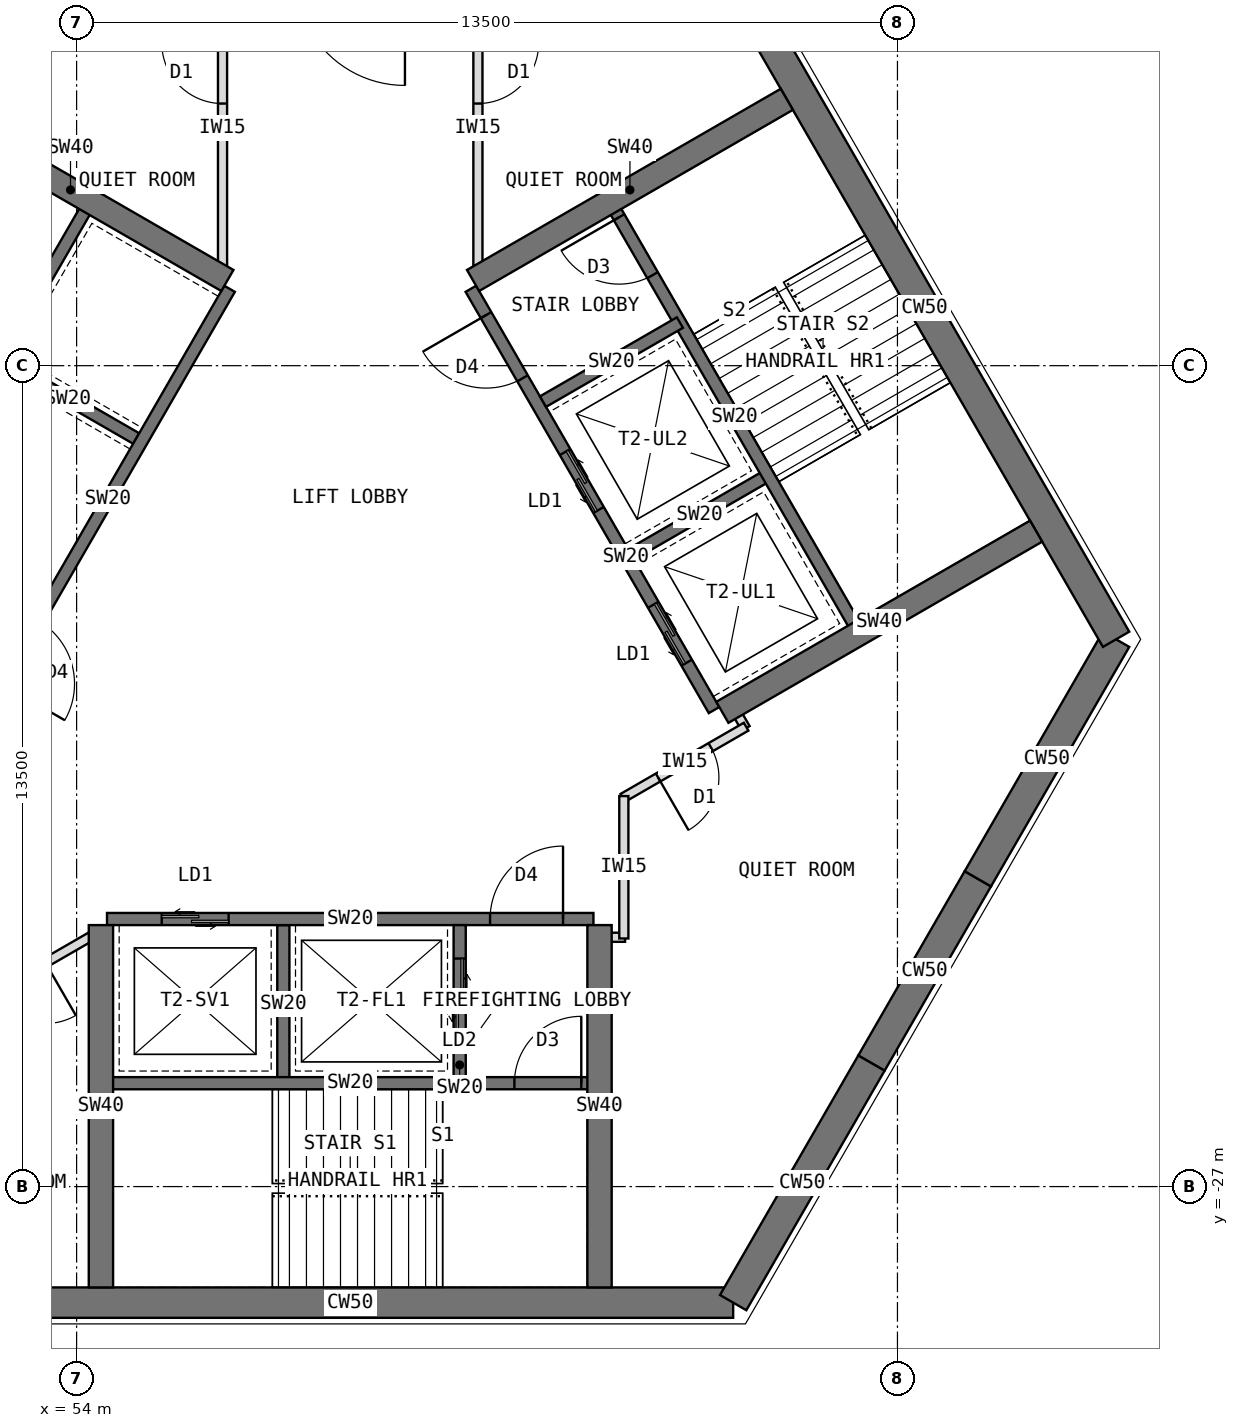
"""IFC4 building model, lengths in metres.
Left out: names, types, materials, properties, quantities, classifications, styles, units other than length and angle.
Written with IfcOpenShell. Run it as: python <this file> out.ifc"""

import sys

from ifc_helpers import new_model, si_unit, direction, frame, frame_2d, origin, place, context, subcontext, project, spatial, rectangle, extrude, element, fill, save


model = new_model("IFC4")
c1 = context("Model", 3, precision=1e-05, world=origin(), true_north=direction((0.0, 1.0)))
c2 = subcontext(c1, "Body", "Model", "MODEL_VIEW")
j1 = project(units=[si_unit("LENGTHUNIT", "METRE"), si_unit("PLANEANGLEUNIT", "RADIAN")], contexts=[c1])
p1 = place(None, origin())
s1 = spatial("IfcSite", under=j1, at=p1, CompositionType="ELEMENT")
p2 = place(p1, origin())
s2 = spatial("IfcBuilding", under=s1, at=p2, CompositionType="ELEMENT")
p3 = place(p2, frame((0.0, 0.0, 234.5)))
s3 = spatial("IfcBuildingStorey", under=s2, at=p3, CompositionType="ELEMENT", Elevation=234.5)
p4 = place(p3, frame((52.202, -28.908, 0.0), z_axis=(0.0, 0.0, 1.0), x_axis=(1.0, 0.0, 0.0)))
e1 = element("IfcWall", 1, at=p4, inside=s3, PredefinedType="SHEAR", context=c2, shape_type="SweptSolid", body=[
    extrude(rectangle(XDim=12.596, YDim=0.5, at=frame_2d((6.298, 0.0))), origin(), (0.0, 0.0, 1.0), 4.0),
])
p5 = place(p3, frame((64.798, -28.908, 0.0), z_axis=(0.0, 0.0, 1.0), x_axis=(0.499984222037, 0.866034513004, 0.0)))
e2 = element("IfcWall", 2, at=p5, inside=s3, PredefinedType="SHEAR", context=c2, shape_type="SweptSolid", body=[
    extrude(rectangle(XDim=4.548, YDim=0.5, at=frame_2d((2.274, 0.0))), origin(), (0.0, 0.0, 1.0), 4.0),
])
p6 = place(p3, frame((67.072, -24.97, 0.0), z_axis=(0.0, 0.0, 1.0), x_axis=(0.500010275428, 0.866019471182, 0.0)))
e3 = element("IfcWall", 3, at=p6, inside=s3, PredefinedType="SHEAR", context=c2, shape_type="SweptSolid", body=[
    extrude(rectangle(XDim=3.5, YDim=0.5, at=frame_2d((1.75, 0.0))), origin(), (0.0, 0.0, 1.0), 4.0),
])
p7 = place(p3, frame((68.822, -21.939, 0.0), z_axis=(0.0, 0.0, 1.0), x_axis=(0.500024481964, 0.866011268655, 0.0)))
e4 = element("IfcWall", 4, at=p7, inside=s3, PredefinedType="SHEAR", context=c2, shape_type="SweptSolid", body=[
    extrude(rectangle(XDim=4.548, YDim=0.5, at=frame_2d((2.274, 0.0))), origin(), (0.0, 0.0, 1.0), 4.0),
])
p8 = place(p3, frame((71.096, -18.0, 0.0), z_axis=(0.0, 0.0, 1.0), x_axis=(-0.500005998175, 0.866021940709, 0.0)))
e5 = element("IfcWall", 5, at=p8, inside=s3, PredefinedType="SHEAR", context=c2, shape_type="SweptSolid", body=[
    extrude(rectangle(XDim=12.596, YDim=0.5, at=frame_2d((6.298, 0.0))), origin(), (0.0, 0.0, 1.0), 4.0),
])
p9 = place(p3, frame((56.516, -12.236, 0.0), z_axis=(0.0, 0.0, 1.0), x_axis=(-0.49999894854, -0.866026010844, 0.0)))
e6 = element("IfcWall", 6, at=p9, inside=s3, PredefinedType="SHEAR", context=c2, shape_type="SweptSolid", body=[
    extrude(rectangle(XDim=8.0, YDim=0.2, at=frame_2d((4.0, 0.0))), origin(), (0.0, 0.0, 1.0), 4.0),
])
p10 = place(p9, frame((6.3, 0.0, 0.0)))
e7 = element("IfcOpeningElement", 7, at=p10, cuts=e6, PredefinedType="OPENING", context=c2, shape_type="SweptSolid", body=[
    extrude(rectangle(XDim=1.2, YDim=2.1, at=frame_2d((0.6, 1.05))), frame((0.0, 0.11, 0.0), z_axis=(0.0, -1.0, 0.0), x_axis=(1.0, 0.0, 0.0)), (0.0, 0.0, 1.0), 0.22),
])
p11 = place(p3, frame((54.98, -14.697, 0.0), z_axis=(0.0, 0.0, 1.0), x_axis=(-0.866062058628, 0.499936506574, 0.0)))
e8 = element("IfcWall", 8, at=p11, inside=s3, PredefinedType="SHEAR", context=c2, shape_type="SweptSolid", body=[
    extrude(rectangle(XDim=2.6, YDim=0.2, at=frame_2d((1.3, 0.0))), origin(), (0.0, 0.0, 1.0), 4.0),
])
p12 = place(p3, frame((54.178, -10.886, 0.0), z_axis=(0.0, 0.0, 1.0), x_axis=(-0.49999894854, -0.866026010844, 0.0)))
e9 = element("IfcWall", 9, at=p12, inside=s3, PredefinedType="SHEAR", context=c2, shape_type="SweptSolid", body=[
    extrude(rectangle(XDim=8.0, YDim=0.2, at=frame_2d((4.0, 0.0))), origin(), (0.0, 0.0, 1.0), 4.0),
])
p13 = place(p12, frame((6.8, 0.0, 0.0)))
e10 = element("IfcOpeningElement", 10, at=p13, cuts=e9, PredefinedType="OPENING", context=c2, shape_type="SweptSolid", body=[
    extrude(rectangle(XDim=0.9, YDim=2.1, at=frame_2d((0.45, 1.05))), frame((0.0, 0.11, 0.0), z_axis=(0.0, -1.0, 0.0), x_axis=(1.0, 0.0, 0.0)), (0.0, 0.0, 1.0), 0.22),
])
p14 = place(p3, frame((56.48, -12.099, 0.0), z_axis=(0.0, 0.0, 1.0), x_axis=(-0.86602319114, 0.500003832394, 0.0)))
e11 = element("IfcWall", 11, at=p14, inside=s3, PredefinedType="SHEAR", context=c2, shape_type="SweptSolid", body=[
    extrude(rectangle(XDim=5.958, YDim=0.4, at=frame_2d((2.979, 0.0))), origin(), (0.0, 0.0, 1.0), 4.0),
])
p15 = place(p3, frame((54.5, -22.6, 0.0), z_axis=(0.0, 0.0, 1.0), x_axis=(1.0, 0.0, 0.0)))
e12 = element("IfcWall", 12, at=p15, inside=s3, PredefinedType="SHEAR", context=c2, shape_type="SweptSolid", body=[
    extrude(rectangle(XDim=8.0, YDim=0.2, at=frame_2d((4.0, 0.0))), origin(), (0.0, 0.0, 1.0), 4.0),
])
p16 = place(p15, frame((6.3, 0.0, 0.0)))
e13 = element("IfcOpeningElement", 13, at=p16, cuts=e12, PredefinedType="OPENING", context=c2, shape_type="SweptSolid", body=[
    extrude(rectangle(XDim=1.2, YDim=2.1, at=frame_2d((0.6, 1.05))), frame((0.0, 0.11, 0.0), z_axis=(0.0, -1.0, 0.0), x_axis=(1.0, 0.0, 0.0)), (0.0, 0.0, 1.0), 0.22),
])
p17 = place(p15, frame((0.9, 0.0, 0.0)))
e14 = element("IfcOpeningElement", 14, at=p17, cuts=e12, PredefinedType="OPENING", context=c2, shape_type="SweptSolid", body=[
    extrude(rectangle(XDim=1.1, YDim=2.2, at=frame_2d((0.55, 1.1))), frame((0.0, 0.11, 0.0), z_axis=(0.0, -1.0, 0.0), x_axis=(1.0, 0.0, 0.0)), (0.0, 0.0, 1.0), 0.22),
])
p18 = place(p3, frame((57.4, -22.7, 0.0), z_axis=(0.0, 0.0, 1.0), x_axis=(0.0, -1.0, 0.0)))
e15 = element("IfcWall", 15, at=p18, inside=s3, PredefinedType="SHEAR", context=c2, shape_type="SweptSolid", body=[
    extrude(rectangle(XDim=2.6, YDim=0.2, at=frame_2d((1.3, 0.0))), origin(), (0.0, 0.0, 1.0), 4.0),
])
p19 = place(p3, frame((60.3, -22.7, 0.0), z_axis=(0.0, 0.0, 1.0), x_axis=(0.0, -1.0, 0.0)))
e16 = element("IfcWall", 16, at=p19, inside=s3, PredefinedType="SHEAR", context=c2, shape_type="SweptSolid", body=[
    extrude(rectangle(XDim=2.6, YDim=0.2, at=frame_2d((1.3, 0.0))), origin(), (0.0, 0.0, 1.0), 4.0),
])
p20 = place(p19, frame((0.55, 0.0, 0.0)))
e17 = element("IfcOpeningElement", 17, at=p20, cuts=e16, PredefinedType="OPENING", context=c2, shape_type="SweptSolid", body=[
    extrude(rectangle(XDim=1.3, YDim=2.2, at=frame_2d((0.65, 1.1))), frame((0.0, 0.11, 0.0), z_axis=(0.0, -1.0, 0.0), x_axis=(1.0, 0.0, 0.0)), (0.0, 0.0, 1.0), 0.22),
])
p21 = place(p3, frame((54.5, -25.3, 0.0), z_axis=(0.0, 0.0, 1.0), x_axis=(1.0, 0.0, 0.0)))
e18 = element("IfcWall", 18, at=p21, inside=s3, PredefinedType="SHEAR", context=c2, shape_type="SweptSolid", body=[
    extrude(rectangle(XDim=8.0, YDim=0.2, at=frame_2d((4.0, 0.0))), origin(), (0.0, 0.0, 1.0), 4.0),
])
p22 = place(p21, frame((6.7, 0.0, 0.0)))
e19 = element("IfcOpeningElement", 19, at=p22, cuts=e18, PredefinedType="OPENING", context=c2, shape_type="SweptSolid", body=[
    extrude(rectangle(XDim=1.1, YDim=2.1, at=frame_2d((0.55, 1.05))), frame((0.0, 0.11, 0.0), z_axis=(0.0, -1.0, 0.0), x_axis=(1.0, 0.0, 0.0)), (0.0, 0.0, 1.0), 0.22),
])
for number, where, z_axis, x_axis in (
    (20, (62.6, -22.7, 0.0), (0.0, 0.0, 1.0), (0.0, -1.0, 0.0)),
    (21, (54.4, -22.7, 0.0), (0.0, 0.0, 1.0), (0.0, -1.0, 0.0)),
):
    element("IfcWall", number, at=place(p3, frame(where, z_axis=z_axis, x_axis=x_axis)), inside=s3, PredefinedType="SHEAR", context=c2, shape_type="SweptSolid", body=[
        extrude(rectangle(XDim=5.958, YDim=0.4, at=frame_2d((2.979, 0.0))), origin(), (0.0, 0.0, 1.0), 4.0),
    ])
p23 = place(p3, frame((64.484, -19.164, 0.0), z_axis=(0.0, 0.0, 1.0), x_axis=(-0.49999894854, 0.866026010844, 0.0)))
e22 = element("IfcWall", 22, at=p23, inside=s3, PredefinedType="SHEAR", context=c2, shape_type="SweptSolid", body=[
    extrude(rectangle(XDim=8.0, YDim=0.2, at=frame_2d((4.0, 0.0))), origin(), (0.0, 0.0, 1.0), 4.0),
])
p24 = place(p23, frame((6.3, 0.0, 0.0)))
e23 = element("IfcOpeningElement", 23, at=p24, cuts=e22, PredefinedType="OPENING", context=c2, shape_type="SweptSolid", body=[
    extrude(rectangle(XDim=1.2, YDim=2.1, at=frame_2d((0.6, 1.05))), frame((0.0, 0.11, 0.0), z_axis=(0.0, -1.0, 0.0), x_axis=(1.0, 0.0, 0.0)), (0.0, 0.0, 1.0), 0.22),
])
p25 = place(p23, frame((0.9, 0.0, 0.0)))
e24 = element("IfcOpeningElement", 24, at=p25, cuts=e22, PredefinedType="OPENING", context=c2, shape_type="SweptSolid", body=[
    extrude(rectangle(XDim=1.1, YDim=2.2, at=frame_2d((0.55, 1.1))), frame((0.0, 0.11, 0.0), z_axis=(0.0, -1.0, 0.0), x_axis=(1.0, 0.0, 0.0)), (0.0, 0.0, 1.0), 0.22),
])
p26 = place(p23, frame((3.8, 0.0, 0.0)))
e25 = element("IfcOpeningElement", 25, at=p26, cuts=e22, PredefinedType="OPENING", context=c2, shape_type="SweptSolid", body=[
    extrude(rectangle(XDim=1.1, YDim=2.2, at=frame_2d((0.55, 1.1))), frame((0.0, 0.11, 0.0), z_axis=(0.0, -1.0, 0.0), x_axis=(1.0, 0.0, 0.0)), (0.0, 0.0, 1.0), 0.22),
])
p27 = place(p3, frame((63.12, -16.603, 0.0), z_axis=(0.0, 0.0, 1.0), x_axis=(0.866062058628, 0.499936506574, 0.0)))
e26 = element("IfcWall", 26, at=p27, inside=s3, PredefinedType="SHEAR", context=c2, shape_type="SweptSolid", body=[
    extrude(rectangle(XDim=2.6, YDim=0.2, at=frame_2d((1.3, 0.0))), origin(), (0.0, 0.0, 1.0), 4.0),
])
p28 = place(p3, frame((61.67, -14.091, 0.0), z_axis=(0.0, 0.0, 1.0), x_axis=(0.86603858612, 0.49997716683, 0.0)))
e27 = element("IfcWall", 27, at=p28, inside=s3, PredefinedType="SHEAR", context=c2, shape_type="SweptSolid", body=[
    extrude(rectangle(XDim=2.6, YDim=0.2, at=frame_2d((1.3, 0.0))), origin(), (0.0, 0.0, 1.0), 4.0),
])
p29 = place(p3, frame((66.822, -17.814, 0.0), z_axis=(0.0, 0.0, 1.0), x_axis=(-0.49999894854, 0.866026010844, 0.0)))
e28 = element("IfcWall", 28, at=p29, inside=s3, PredefinedType="SHEAR", context=c2, shape_type="SweptSolid", body=[
    extrude(rectangle(XDim=8.0, YDim=0.2, at=frame_2d((4.0, 0.0))), origin(), (0.0, 0.0, 1.0), 4.0),
])
p30 = place(p29, frame((6.7, 0.0, 0.0)))
e29 = element("IfcOpeningElement", 29, at=p30, cuts=e28, PredefinedType="OPENING", context=c2, shape_type="SweptSolid", body=[
    extrude(rectangle(XDim=1.1, YDim=2.1, at=frame_2d((0.55, 1.05))), frame((0.0, 0.11, 0.0), z_axis=(0.0, -1.0, 0.0), x_axis=(1.0, 0.0, 0.0)), (0.0, 0.0, 1.0), 0.22),
])
p31 = place(p3, frame((60.52, -12.099, 0.0), z_axis=(0.0, 0.0, 1.0), x_axis=(0.86602319114, 0.500003832394, 0.0)))
e30 = element("IfcWall", 30, at=p31, inside=s3, PredefinedType="SHEAR", context=c2, shape_type="SweptSolid", body=[
    extrude(rectangle(XDim=5.958, YDim=0.4, at=frame_2d((2.979, 0.0))), origin(), (0.0, 0.0, 1.0), 4.0),
])
p32 = place(p3, frame((64.62, -19.201, 0.0), z_axis=(0.0, 0.0, 1.0), x_axis=(0.866012946976, 0.500021575205, 0.0)))
e31 = element("IfcWall", 31, at=p32, inside=s3, PredefinedType="SHEAR", context=c2, shape_type="SweptSolid", body=[
    extrude(rectangle(XDim=5.958, YDim=0.4, at=frame_2d((2.979, 0.0))), origin(), (0.0, 0.0, 1.0), 4.0),
])
p33 = place(p3, frame((63.02, -22.9, 0.0), z_axis=(0.0, 0.0, 1.0), x_axis=(-1.0, 0.0, 0.0)))
e32 = element("IfcWall", 32, at=p33, inside=s3, PredefinedType="PARTITIONING", context=c2, shape_type="SweptSolid", body=[
    extrude(rectangle(XDim=0.43, YDim=0.15, at=frame_2d((0.215, 0.0))), origin(), (0.0, 0.0, 1.0), 3.7),
])
p34 = place(p3, frame((54.23, -22.89, 0.0), z_axis=(0.0, 0.0, 1.0), x_axis=(-0.866006805923, -0.500032211057, 0.0)))
e33 = element("IfcWall", 33, at=p34, inside=s3, PredefinedType="PARTITIONING", context=c2, shape_type="SweptSolid", body=[
    extrude(rectangle(XDim=4.526, YDim=0.15, at=frame_2d((2.263, 0.0))), origin(), (0.0, 0.0, 1.0), 3.7),
])
p35 = place(p34, frame((0.858, 0.0, 0.0)))
e34 = element("IfcOpeningElement", 34, at=p35, cuts=e33, PredefinedType="OPENING", context=c2, shape_type="SweptSolid", body=[
    extrude(rectangle(XDim=1.0, YDim=2.1, at=frame_2d((0.5, 1.05))), frame((0.0, 0.085, 0.0), z_axis=(0.0, -1.0, 0.0), x_axis=(1.0, 0.0, 0.0)), (0.0, 0.0, 1.0), 0.17),
])
p36 = place(p3, frame((56.4, -11.857, 0.0), z_axis=(0.0, 0.0, 1.0), x_axis=(0.0, 1.0, 0.0)))
e35 = element("IfcWall", 35, at=p36, inside=s3, PredefinedType="PARTITIONING", context=c2, shape_type="SweptSolid", body=[
    extrude(rectangle(XDim=4.526, YDim=0.15, at=frame_2d((2.263, 0.0))), origin(), (0.0, 0.0, 1.0), 3.7),
])
p37 = place(p36, frame((2.668, 0.0, 0.0)))
e36 = element("IfcOpeningElement", 36, at=p37, cuts=e35, PredefinedType="OPENING", context=c2, shape_type="SweptSolid", body=[
    extrude(rectangle(XDim=1.0, YDim=2.1, at=frame_2d((0.5, 1.05))), frame((0.0, 0.085, 0.0), z_axis=(0.0, -1.0, 0.0), x_axis=(1.0, 0.0, 0.0)), (0.0, 0.0, 1.0), 0.17),
])
p38 = place(p3, frame((60.6, -7.332, 0.0), z_axis=(0.0, 0.0, 1.0), x_axis=(0.0, -1.0, 0.0)))
e37 = element("IfcWall", 37, at=p38, inside=s3, PredefinedType="PARTITIONING", context=c2, shape_type="SweptSolid", body=[
    extrude(rectangle(XDim=4.526, YDim=0.15, at=frame_2d((2.263, 0.0))), origin(), (0.0, 0.0, 1.0), 3.7),
])
p39 = place(p38, frame((0.858, 0.0, 0.0)))
e38 = element("IfcOpeningElement", 38, at=p39, cuts=e37, PredefinedType="OPENING", context=c2, shape_type="SweptSolid", body=[
    extrude(rectangle(XDim=1.0, YDim=2.1, at=frame_2d((0.5, 1.05))), frame((0.0, 0.085, 0.0), z_axis=(0.0, -1.0, 0.0), x_axis=(1.0, 0.0, 0.0)), (0.0, 0.0, 1.0), 0.17),
])
p40 = place(p3, frame((64.789, -19.092, 0.0), z_axis=(0.0, 0.0, 1.0), x_axis=(0.499804398801, -0.866138304741, 0.0)))
e39 = element("IfcWall", 39, at=p40, inside=s3, PredefinedType="PARTITIONING", context=c2, shape_type="SweptSolid", body=[
    extrude(rectangle(XDim=0.43, YDim=0.15, at=frame_2d((0.215, 0.0))), origin(), (0.0, 0.0, 1.0), 3.7),
])
p41 = place(p3, frame((65.011, -19.437, 0.0), z_axis=(0.0, 0.0, 1.0), x_axis=(-0.865982457891, -0.500074377092, 0.0)))
e40 = element("IfcWall", 40, at=p41, inside=s3, PredefinedType="PARTITIONING", context=c2, shape_type="SweptSolid", body=[
    extrude(rectangle(XDim=2.342, YDim=0.15, at=frame_2d((1.171, 0.0))), origin(), (0.0, 0.0, 1.0), 3.7),
])
p42 = place(p41, frame((0.671, 0.0, 0.0)))
e41 = element("IfcOpeningElement", 41, at=p42, cuts=e40, PredefinedType="OPENING", context=c2, shape_type="SweptSolid", body=[
    extrude(rectangle(XDim=1.0, YDim=2.1, at=frame_2d((0.5, 1.05))), frame((0.0, 0.085, 0.0), z_axis=(0.0, -1.0, 0.0), x_axis=(1.0, 0.0, 0.0)), (0.0, 0.0, 1.0), 0.17),
])
p43 = place(p3, frame((63.0, -20.578, 0.0), z_axis=(0.0, 0.0, 1.0), x_axis=(0.0, -1.0, 0.0)))
e42 = element("IfcWall", 42, at=p43, inside=s3, PredefinedType="PARTITIONING", context=c2, shape_type="SweptSolid", body=[
    extrude(rectangle(XDim=2.342, YDim=0.15, at=frame_2d((1.171, 0.0))), origin(), (0.0, 0.0, 1.0), 3.7),
])
p44 = place(p16, origin())
e43 = element("IfcDoor", 43, at=p44, inside=s3, OperationType="SINGLE_SWING_RIGHT", PredefinedType="DOOR", context=c2, shape_type="SweptSolid", body=[
    extrude(rectangle(XDim=1.2, YDim=2.1, at=frame_2d((0.6, 1.05))), frame((0.0, 0.025, 0.0), z_axis=(0.0, -1.0, 0.0), x_axis=(1.0, 0.0, 0.0)), (0.0, 0.0, 1.0), 0.05),
])
fill(e13, e43)
p45 = place(p20, origin())
e44 = element("IfcDoor", 44, at=p45, inside=s3, OperationType="DOUBLE_DOOR_SLIDING", PredefinedType="DOOR", context=c2, shape_type="SweptSolid", body=[
    extrude(rectangle(XDim=1.3, YDim=2.2, at=frame_2d((0.65, 1.1))), frame((0.0, 0.025, 0.0), z_axis=(0.0, -1.0, 0.0), x_axis=(1.0, 0.0, 0.0)), (0.0, 0.0, 1.0), 0.05),
])
fill(e17, e44)
p46 = place(p17, origin())
e45 = element("IfcDoor", 45, at=p46, inside=s3, OperationType="DOUBLE_DOOR_SLIDING", PredefinedType="DOOR", context=c2, shape_type="SweptSolid", body=[
    extrude(rectangle(XDim=1.1, YDim=2.2, at=frame_2d((0.55, 1.1))), frame((0.0, 0.025, 0.0), z_axis=(0.0, -1.0, 0.0), x_axis=(1.0, 0.0, 0.0)), (0.0, 0.0, 1.0), 0.05),
])
fill(e14, e45)
p47 = place(p22, origin())
e46 = element("IfcDoor", 46, at=p47, inside=s3, OperationType="SINGLE_SWING_RIGHT", PredefinedType="DOOR", context=c2, shape_type="SweptSolid", body=[
    extrude(rectangle(XDim=1.1, YDim=2.1, at=frame_2d((0.55, 1.05))), frame((0.0, 0.025, 0.0), z_axis=(0.0, -1.0, 0.0), x_axis=(1.0, 0.0, 0.0)), (0.0, 0.0, 1.0), 0.05),
])
fill(e19, e46)
p48 = place(p24, origin())
e47 = element("IfcDoor", 47, at=p48, inside=s3, OperationType="SINGLE_SWING_RIGHT", PredefinedType="DOOR", context=c2, shape_type="SweptSolid", body=[
    extrude(rectangle(XDim=1.2, YDim=2.1, at=frame_2d((0.6, 1.05))), frame((0.0, 0.025, 0.0), z_axis=(0.0, -1.0, 0.0), x_axis=(1.0, 0.0, 0.0)), (0.0, 0.0, 1.0), 0.05),
])
fill(e23, e47)
p49 = place(p25, origin())
e48 = element("IfcDoor", 48, at=p49, inside=s3, OperationType="DOUBLE_DOOR_SLIDING", PredefinedType="DOOR", context=c2, shape_type="SweptSolid", body=[
    extrude(rectangle(XDim=1.1, YDim=2.2, at=frame_2d((0.55, 1.1))), frame((0.0, 0.025, 0.0), z_axis=(0.0, -1.0, 0.0), x_axis=(1.0, 0.0, 0.0)), (0.0, 0.0, 1.0), 0.05),
])
fill(e24, e48)
p50 = place(p26, origin())
e49 = element("IfcDoor", 49, at=p50, inside=s3, OperationType="DOUBLE_DOOR_SLIDING", PredefinedType="DOOR", context=c2, shape_type="SweptSolid", body=[
    extrude(rectangle(XDim=1.1, YDim=2.2, at=frame_2d((0.55, 1.1))), frame((0.0, 0.025, 0.0), z_axis=(0.0, -1.0, 0.0), x_axis=(1.0, 0.0, 0.0)), (0.0, 0.0, 1.0), 0.05),
])
fill(e25, e49)
p51 = place(p30, origin())
e50 = element("IfcDoor", 50, at=p51, inside=s3, OperationType="SINGLE_SWING_RIGHT", PredefinedType="DOOR", context=c2, shape_type="SweptSolid", body=[
    extrude(rectangle(XDim=1.1, YDim=2.1, at=frame_2d((0.55, 1.05))), frame((0.0, 0.025, 0.0), z_axis=(0.0, -1.0, 0.0), x_axis=(1.0, 0.0, 0.0)), (0.0, 0.0, 1.0), 0.05),
])
fill(e29, e50)
p52 = place(p42, origin())
e51 = element("IfcDoor", 51, at=p52, inside=s3, OperationType="SINGLE_SWING_RIGHT", PredefinedType="DOOR", context=c2, shape_type="SweptSolid", body=[
    extrude(rectangle(XDim=1.0, YDim=2.1, at=frame_2d((0.5, 1.05))), frame((0.0, 0.025, 0.0), z_axis=(0.0, -1.0, 0.0), x_axis=(1.0, 0.0, 0.0)), (0.0, 0.0, 1.0), 0.05),
])
fill(e41, e51)
p53 = place(p39, origin())
e52 = element("IfcDoor", 52, at=p53, inside=s3, OperationType="SINGLE_SWING_LEFT", PredefinedType="DOOR", context=c2, shape_type="SweptSolid", body=[
    extrude(rectangle(XDim=1.0, YDim=2.1, at=frame_2d((0.5, 1.05))), frame((0.0, 0.025, 0.0), z_axis=(0.0, -1.0, 0.0), x_axis=(1.0, 0.0, 0.0)), (0.0, 0.0, 1.0), 0.05),
])
fill(e38, e52)
p54 = place(p37, origin())
e53 = element("IfcDoor", 53, at=p54, inside=s3, OperationType="SINGLE_SWING_RIGHT", PredefinedType="DOOR", context=c2, shape_type="SweptSolid", body=[
    extrude(rectangle(XDim=1.0, YDim=2.1, at=frame_2d((0.5, 1.05))), frame((0.0, 0.025, 0.0), z_axis=(0.0, -1.0, 0.0), x_axis=(1.0, 0.0, 0.0)), (0.0, 0.0, 1.0), 0.05),
])
fill(e36, e53)
save(model, sys.argv[1])
